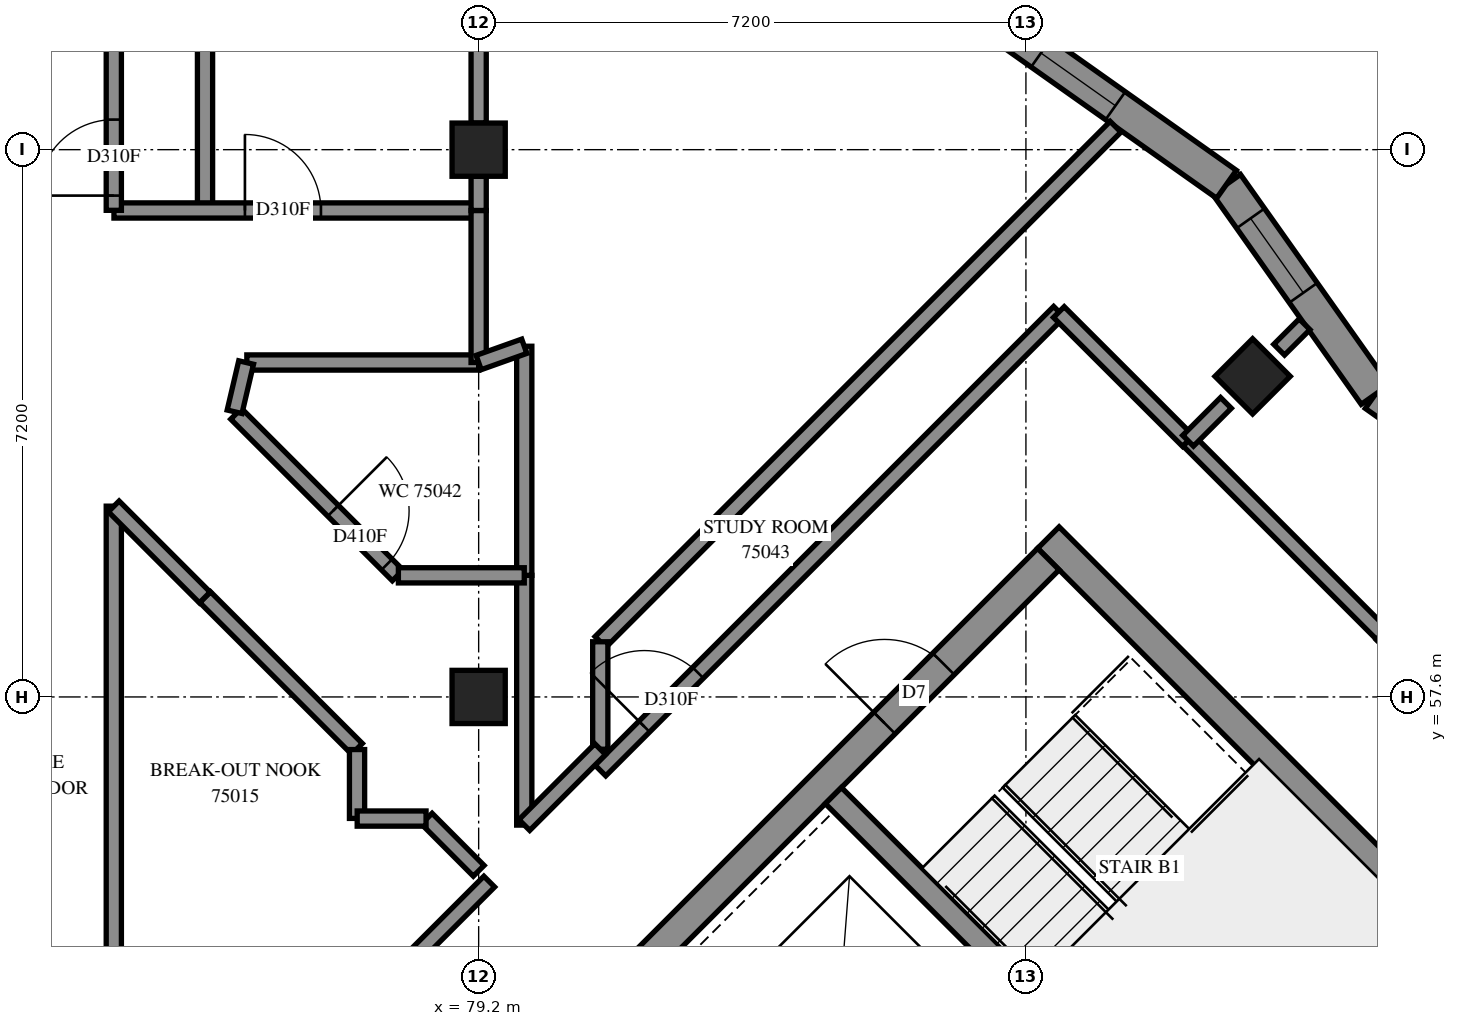
"""IFC4 building model, lengths in metres.
Left out: names, types, materials, properties, quantities, classifications, styles, units other than length and angle.
Written with IfcOpenShell. Run it as: python <this file> out.ifc"""

import sys

from ifc_helpers import new_model, si_unit, direction, frame, frame_2d, origin, origin_2d, place, context, subcontext, project, spatial, polyline, rectangle, outline, extrude, element, fill, save


model = new_model("IFC4")
c1 = context("Model", 3, precision=1e-05, world=origin(), true_north=direction((0.0, 1.0)))
c2 = subcontext(c1, "Body", "Model", "MODEL_VIEW")
j1 = project(units=[si_unit("LENGTHUNIT", "METRE"), si_unit("PLANEANGLEUNIT", "RADIAN")], contexts=[c1])
p1 = place(None, origin())
s1 = spatial("IfcSite", under=j1, at=p1, CompositionType="ELEMENT")
p2 = place(p1, origin())
s2 = spatial("IfcBuilding", under=s1, at=p2, CompositionType="ELEMENT")
p3 = place(p2, frame((0.0, 0.0, 274.4)))
s3 = spatial("IfcBuildingStorey", under=s2, at=p3, CompositionType="ELEMENT", Elevation=274.4)
for number, where, z_axis, x_axis in (
    (1, (79.2, 57.6, 0.0), (0.0, 0.0, 1.0), (1.0, 0.0, 0.0)),
    (2, (79.2, 64.8, 0.0), (0.0, 0.0, 1.0), (1.0, 0.0, 0.0)),
    (3, (89.382, 61.818, 0.0), (0.0, 0.0, 1.0), (0.707, -0.707, 0.0)),
):
    element("IfcColumn", number, at=place(p3, frame(where, z_axis=z_axis, x_axis=x_axis)), inside=s3, PredefinedType="COLUMN", context=c2, shape_type="SweptSolid", body=[
        extrude(rectangle(XDim=0.7, YDim=0.7, at=origin_2d()), origin(), (0.0, 0.0, 1.0), 3.1),
    ])
p4 = place(p3, frame((86.695, 59.696, -0.3), z_axis=(0.0, 0.0, 1.0), x_axis=(0.7071100706, -0.7071034917, 0.0)))
e4 = element("IfcWall", 4, at=p4, inside=s3, PredefinedType="SHEAR", context=c2, shape_type="SweptSolid", body=[
    extrude(rectangle(XDim=15.2, YDim=0.4, at=frame_2d((7.6, 0.0))), origin(), (0.0, 0.0, 1.0), 2.7),
])
p5 = place(p4, frame((10.4, 0.0, 0.3)))
e5 = element("IfcOpeningElement", 5, at=p5, cuts=e4, PredefinedType="OPENING", context=c2, shape_type="SweptSolid", body=[
    extrude(rectangle(XDim=0.8, YDim=2.1, at=frame_2d((0.4, 1.05))), frame((0.0, 0.21, 0.0), z_axis=(0.0, -1.0, 0.0), x_axis=(1.0, 0.0, 0.0)), (0.0, 0.0, 1.0), 0.42),
])
p6 = place(p3, frame((76.513, 49.231, -0.3), z_axis=(0.0, 0.0, 1.0), x_axis=(0.7071067812, 0.7071067812, 0.0)))
e6 = element("IfcWall", 6, at=p6, inside=s3, PredefinedType="SHEAR", context=c2, shape_type="SweptSolid", body=[
    extrude(rectangle(XDim=14.4, YDim=0.4, at=frame_2d((7.2, 0.0))), origin(), (0.0, 0.0, 1.0), 2.7),
])
p7 = place(p6, frame((4.55, 0.0, 0.3)))
e7 = element("IfcOpeningElement", 7, at=p7, cuts=e6, PredefinedType="OPENING", context=c2, shape_type="SweptSolid", body=[
    extrude(rectangle(XDim=1.1, YDim=2.1, at=frame_2d((0.55, 1.05))), frame((0.0, 0.21, 0.0), z_axis=(0.0, -1.0, 0.0), x_axis=(1.0, 0.0, 0.0)), (0.0, 0.0, 1.0), 0.42),
])
p8 = place(p6, frame((11.35, 0.0, 0.3)))
e8 = element("IfcOpeningElement", 8, at=p8, cuts=e6, PredefinedType="OPENING", context=c2, shape_type="SweptSolid", body=[
    extrude(rectangle(XDim=1.1, YDim=2.1, at=frame_2d((0.55, 1.05))), frame((0.0, 0.21, 0.0), z_axis=(0.0, -1.0, 0.0), x_axis=(1.0, 0.0, 0.0)), (0.0, 0.0, 1.0), 0.42),
])
p9 = place(p3, frame((83.867, 56.302, 0.0), z_axis=(0.0, 0.0, 1.0), x_axis=(0.7071137256, -0.7070998367, 0.0)))
e9 = element("IfcWall", 9, at=p9, inside=s3, PredefinedType="SOLIDWALL", context=c2, shape_type="SweptSolid", body=[
    extrude(rectangle(XDim=7.2, YDim=0.3, at=frame_2d((3.6, 0.0))), origin(), (0.0, 0.0, 1.0), 3.1),
])
p10 = place(p3, frame((93.76, 59.623, 0.0), z_axis=(0.0, 0.0, 1.0), x_axis=(-0.8163643715, 0.5775371961, 0.0)))
e10 = element("IfcWall", 10, at=p10, inside=s3, PredefinedType="SOLIDWALL", context=c2, shape_type="SweptSolid", body=[
    extrude(outline(polyline([(-0.039, -0.225), (3.348, -0.225), (3.425, 0.225), (0.039, 0.225), (-0.039, -0.225)])), origin(), (0.0, 0.0, 1.0), 3.1),
])
p11 = place(p10, frame((1.525, 0.0, 0.45)))
e11 = element("IfcOpeningElement", 11, at=p11, cuts=e10, PredefinedType="OPENING", context=c2, shape_type="SweptSolid", body=[
    extrude(rectangle(XDim=1.2, YDim=2.55, at=frame_2d((0.6, 1.275))), frame((0.0, 0.235, 0.0), z_axis=(0.0, -1.0, 0.0), x_axis=(1.0, 0.0, 0.0)), (0.0, 0.0, 1.0), 0.47),
])
p12 = place(p3, frame((90.995, 61.579, 0.0), z_axis=(0.0, 0.0, 1.0), x_axis=(-0.5775314394, 0.8163684441, 0.0)))
e12 = element("IfcWall", 12, at=p12, inside=s3, PredefinedType="SOLIDWALL", context=c2, shape_type="SweptSolid", body=[
    extrude(outline(polyline([(0.039, -0.225), (3.425, -0.225), (3.348, 0.225), (-0.039, 0.225), (0.039, -0.225)])), origin(), (0.0, 0.0, 1.0), 3.1),
])
p13 = place(p12, frame((1.638, 0.0, 0.45)))
e13 = element("IfcOpeningElement", 13, at=p13, cuts=e12, PredefinedType="OPENING", context=c2, shape_type="SweptSolid", body=[
    extrude(rectangle(XDim=1.2, YDim=2.55, at=frame_2d((0.6, 1.275))), frame((0.0, 0.235, 0.0), z_axis=(0.0, -1.0, 0.0), x_axis=(1.0, 0.0, 0.0)), (0.0, 0.0, 1.0), 0.47),
])
p14 = place(p3, frame((89.039, 64.344, 0.0), z_axis=(0.0, 0.0, 1.0), x_axis=(-0.8163643715, 0.5775371961, 0.0)))
e14 = element("IfcWall", 14, at=p14, inside=s3, PredefinedType="SOLIDWALL", context=c2, shape_type="SweptSolid", body=[
    extrude(outline(polyline([(-0.039, -0.225), (3.348, -0.225), (3.425, 0.225), (0.039, 0.225), (-0.039, -0.225)])), origin(), (0.0, 0.0, 1.0), 3.1),
])
p15 = place(p14, frame((1.79, 0.0, 0.45)))
e15 = element("IfcOpeningElement", 15, at=p15, cuts=e14, PredefinedType="OPENING", context=c2, shape_type="SweptSolid", body=[
    extrude(rectangle(XDim=1.2, YDim=2.55, at=frame_2d((0.6, 1.275))), frame((0.0, 0.235, 0.0), z_axis=(0.0, -1.0, 0.0), x_axis=(1.0, 0.0, 0.0)), (0.0, 0.0, 1.0), 0.47),
])
p16 = place(p3, frame((80.803, 58.323, 0.0), z_axis=(0.0, 0.0, 1.0), x_axis=(0.7070024374, 0.7072111096, 0.0)))
e16 = element("IfcWall", 16, at=p16, inside=s3, PredefinedType="PARTITIONING", context=c2, shape_type="SweptSolid", body=[
    extrude(rectangle(XDim=9.584, YDim=0.2, at=frame_2d((4.792, 0.0))), origin(), (0.0, 0.0, 1.0), 3.1),
])
p17 = place(p3, frame((75.6, 64.0, 0.0), z_axis=(0.0, 0.0, 1.0), x_axis=(0.0, 1.0, 0.0)))
e17 = element("IfcWall", 17, at=p17, inside=s3, PredefinedType="PARTITIONING", context=c2, shape_type="SweptSolid", body=[
    extrude(rectangle(XDim=8.856, YDim=0.2, at=frame_2d((4.428, 0.0))), origin(), (0.0, 0.0, 1.0), 3.1),
])
p18 = place(p3, frame((80.802, 56.633, 0.0), z_axis=(0.0, 0.0, 1.0), x_axis=(0.7071067812, 0.7071067812, 0.0)))
e18 = element("IfcWall", 18, at=p18, inside=s3, PredefinedType="PARTITIONING", context=c2, shape_type="SweptSolid", body=[
    extrude(rectangle(XDim=8.533, YDim=0.2, at=frame_2d((4.267, 0.0))), origin(), (0.0, 0.0, 1.0), 3.1),
])
p19 = place(p18, frame((0.817, 0.0, 0.0)))
e19 = element("IfcOpeningElement", 19, at=p19, cuts=e18, PredefinedType="OPENING", context=c2, shape_type="SweptSolid", body=[
    extrude(rectangle(XDim=1.0, YDim=2.1, at=frame_2d((0.5, 1.05))), frame((0.0, 0.11, 0.0), z_axis=(0.0, -1.0, 0.0), x_axis=(1.0, 0.0, 0.0)), (0.0, 0.0, 1.0), 0.22),
])
p20 = place(p3, frame((91.08, 58.424, 0.0), z_axis=(0.0, 0.0, 1.0), x_axis=(0.7069678741, -0.707245661, 0.0)))
e20 = element("IfcWall", 20, at=p20, inside=s3, PredefinedType="PARTITIONING", context=c2, shape_type="SweptSolid", body=[
    extrude(rectangle(XDim=7.2, YDim=0.2, at=frame_2d((3.6, 0.0))), origin(), (0.0, 0.0, 1.0), 3.1),
])
p21 = place(p20, frame((2.084, 0.0, 0.0)))
e21 = element("IfcOpeningElement", 21, at=p21, cuts=e20, PredefinedType="OPENING", context=c2, shape_type="SweptSolid", body=[
    extrude(rectangle(XDim=1.0, YDim=2.1, at=frame_2d((0.5, 1.05))), frame((0.0, 0.11, 0.0), z_axis=(0.0, -1.0, 0.0), x_axis=(1.0, 0.0, 0.0)), (0.0, 0.0, 1.0), 0.22),
])
p22 = place(p3, frame((74.4, 53.202, 0.0), z_axis=(0.0, 0.0, 1.0), x_axis=(0.0, 1.0, 0.0)))
e22 = element("IfcWall", 22, at=p22, inside=s3, PredefinedType="PARTITIONING", context=c2, shape_type="SweptSolid", body=[
    extrude(rectangle(XDim=6.908, YDim=0.2, at=frame_2d((3.454, 0.0))), origin(), (0.0, 0.0, 1.0), 3.1),
])
p23 = place(p3, frame((79.2, 65.15, 0.0), z_axis=(0.0, 0.0, 1.0), x_axis=(0.0, 1.0, 0.0)))
e23 = element("IfcWall", 23, at=p23, inside=s3, PredefinedType="PARTITIONING", context=c2, shape_type="SweptSolid", body=[
    extrude(rectangle(XDim=6.5, YDim=0.2, at=frame_2d((3.25, 0.0))), origin(), (0.0, 0.0, 1.0), 3.1),
])
p24 = place(p3, frame((74.402, 64.0, 0.0), z_axis=(0.0, 0.0, 1.0), x_axis=(1.0, 0.0, 0.0)))
e24 = element("IfcWall", 24, at=p24, inside=s3, PredefinedType="PARTITIONING", context=c2, shape_type="SweptSolid", body=[
    extrude(rectangle(XDim=4.798, YDim=0.2, at=frame_2d((2.399, 0.0))), origin(), (0.0, 0.0, 1.0), 3.1),
])
p25 = place(p24, frame((1.723, 0.0, 0.0)))
e25 = element("IfcOpeningElement", 25, at=p25, cuts=e24, PredefinedType="OPENING", context=c2, shape_type="SweptSolid", body=[
    extrude(rectangle(XDim=1.0, YDim=2.1, at=frame_2d((0.5, 1.05))), frame((0.0, 0.11, 0.0), z_axis=(0.0, -1.0, 0.0), x_axis=(1.0, 0.0, 0.0)), (0.0, 0.0, 1.0), 0.22),
])
p26 = place(p3, frame((88.537, 60.973, 0.0), z_axis=(0.0, 0.0, 1.0), x_axis=(0.7071067812, -0.7071067812, 0.0)))
e26 = element("IfcWall", 26, at=p26, inside=s3, PredefinedType="PARTITIONING", context=c2, shape_type="SweptSolid", body=[
    extrude(rectangle(XDim=3.601, YDim=0.2, at=frame_2d((1.8, 0.0))), origin(), (0.0, 0.0, 1.0), 3.1),
])
p27 = place(p3, frame((79.8, 55.914, 0.0), z_axis=(0.0, 0.0, 1.0), x_axis=(0.0, 1.0, 0.0)))
e27 = element("IfcWall", 27, at=p27, inside=s3, PredefinedType="PARTITIONING", context=c2, shape_type="SweptSolid", body=[
    extrude(rectangle(XDim=3.286, YDim=0.2, at=frame_2d((1.643, 0.0))), origin(), (0.0, 0.0, 1.0), 3.1),
])
p28 = place(p3, frame((74.4, 64.002, 0.0), z_axis=(0.0, 0.0, 1.0), x_axis=(0.0, 1.0, 0.0)))
e28 = element("IfcWall", 28, at=p28, inside=s3, PredefinedType="PARTITIONING", context=c2, shape_type="SweptSolid", body=[
    extrude(rectangle(XDim=3.198, YDim=0.2, at=frame_2d((1.599, 0.0))), origin(), (0.0, 0.0, 1.0), 3.1),
])
p29 = place(p28, frame((0.194, 0.0, 0.0)))
e29 = element("IfcOpeningElement", 29, at=p29, cuts=e28, PredefinedType="OPENING", context=c2, shape_type="SweptSolid", body=[
    extrude(rectangle(XDim=1.0, YDim=2.1, at=frame_2d((0.5, 1.05))), frame((0.0, 0.11, 0.0), z_axis=(0.0, -1.0, 0.0), x_axis=(1.0, 0.0, 0.0)), (0.0, 0.0, 1.0), 0.22),
])
p30 = place(p3, frame((76.15, 62.0, 0.0), z_axis=(0.0, 0.0, 1.0), x_axis=(1.0, 0.0, 0.0)))
e30 = element("IfcWall", 30, at=p30, inside=s3, PredefinedType="PARTITIONING", context=c2, shape_type="SweptSolid", body=[
    extrude(rectangle(XDim=3.05, YDim=0.2, at=frame_2d((1.525, 0.0))), origin(), (0.0, 0.0, 1.0), 3.1),
])
p31 = place(p3, frame((79.8, 59.2, 0.0), z_axis=(0.0, 0.0, 1.0), x_axis=(0.0, 1.0, 0.0)))
e31 = element("IfcWall", 31, at=p31, inside=s3, PredefinedType="PARTITIONING", context=c2, shape_type="SweptSolid", body=[
    extrude(rectangle(XDim=3.014, YDim=0.2, at=frame_2d((1.507, 0.0))), origin(), (0.0, 0.0, 1.0), 3.1),
])
p32 = place(p3, frame((76.009, 61.325, 0.0), z_axis=(0.0, 0.0, 1.0), x_axis=(0.7071067812, -0.7071067812, 0.0)))
e32 = element("IfcWall", 32, at=p32, inside=s3, PredefinedType="PARTITIONING", context=c2, shape_type="SweptSolid", body=[
    extrude(rectangle(XDim=3.007, YDim=0.2, at=frame_2d((1.503, 0.0))), origin(), (0.0, 0.0, 1.0), 3.1),
])
p33 = place(p32, frame((1.804, 0.0, 0.0)))
e33 = element("IfcOpeningElement", 33, at=p33, cuts=e32, PredefinedType="OPENING", context=c2, shape_type="SweptSolid", body=[
    extrude(rectangle(XDim=1.0, YDim=2.1, at=frame_2d((0.5, 1.05))), frame((0.0, 0.11, 0.0), z_axis=(0.0, -1.0, 0.0), x_axis=(1.0, 0.0, 0.0)), (0.0, 0.0, 1.0), 0.22),
])
p34 = place(p3, frame((75.601, 58.913, 0.0), z_axis=(0.0, 0.0, 1.0), x_axis=(0.707460777, -0.7067526081, 0.0)))
e34 = element("IfcWall", 34, at=p34, inside=s3, PredefinedType="PARTITIONING", context=c2, shape_type="SweptSolid", body=[
    extrude(rectangle(XDim=2.824, YDim=0.2, at=frame_2d((1.412, 0.0))), origin(), (0.0, 0.0, 1.0), 3.1),
])
p35 = place(p3, frame((77.37, 53.2, 0.0), z_axis=(0.0, 0.0, 1.0), x_axis=(0.7071067812, 0.7071067812, 0.0)))
e35 = element("IfcWall", 35, at=p35, inside=s3, PredefinedType="PARTITIONING", context=c2, shape_type="SweptSolid", body=[
    extrude(rectangle(XDim=2.786, YDim=0.2, at=frame_2d((1.393, 0.0))), origin(), (0.0, 0.0, 1.0), 3.1),
])
p36 = place(p3, frame((86.833, 62.663, 0.0), z_axis=(0.0, 0.0, 1.0), x_axis=(0.7075233388, -0.706689978, 0.0)))
e36 = element("IfcWall", 36, at=p36, inside=s3, PredefinedType="PARTITIONING", context=c2, shape_type="SweptSolid", body=[
    extrude(rectangle(XDim=2.4, YDim=0.2, at=frame_2d((1.2, 0.0))), origin(), (0.0, 0.0, 1.0), 3.1),
])
p37 = place(p3, frame((79.2, 62.0, 0.0), z_axis=(0.0, 0.0, 1.0), x_axis=(0.0, 1.0, 0.0)))
e37 = element("IfcWall", 37, at=p37, inside=s3, PredefinedType="PARTITIONING", context=c2, shape_type="SweptSolid", body=[
    extrude(rectangle(XDim=2.0, YDim=0.2, at=frame_2d((1.0, 0.0))), origin(), (0.0, 0.0, 1.0), 3.1),
])
p38 = place(p3, frame((74.399, 60.107, 0.0), z_axis=(0.0, 0.0, 1.0), x_axis=(0.7071067812, -0.7071067812, 0.0)))
e38 = element("IfcWall", 38, at=p38, inside=s3, PredefinedType="PARTITIONING", context=c2, shape_type="SweptSolid", body=[
    extrude(rectangle(XDim=1.694, YDim=0.2, at=frame_2d((0.847, 0.0))), origin(), (0.0, 0.0, 1.0), 3.1),
])
p39 = place(p3, frame((78.144, 59.2, 0.0), z_axis=(0.0, 0.0, 1.0), x_axis=(1.0, 0.0, 0.0)))
e39 = element("IfcWall", 39, at=p39, inside=s3, PredefinedType="PARTITIONING", context=c2, shape_type="SweptSolid", body=[
    extrude(rectangle(XDim=1.656, YDim=0.2, at=frame_2d((0.828, 0.0))), origin(), (0.0, 0.0, 1.0), 3.1),
])
p40 = place(p3, frame((80.8, 56.912, 0.0), z_axis=(0.0, 0.0, 1.0), x_axis=(0.0, 1.0, 0.0)))
e40 = element("IfcWall", 40, at=p40, inside=s3, PredefinedType="PARTITIONING", context=c2, shape_type="SweptSolid", body=[
    extrude(rectangle(XDim=1.414, YDim=0.2, at=frame_2d((0.707, 0.0))), origin(), (0.0, 0.0, 1.0), 3.1),
])
p41 = place(p3, frame((79.801, 55.915, 0.0), z_axis=(0.0, 0.0, 1.0), x_axis=(0.7071067812, 0.7071067812, 0.0)))
e41 = element("IfcWall", 41, at=p41, inside=s3, PredefinedType="PARTITIONING", context=c2, shape_type="SweptSolid", body=[
    extrude(rectangle(XDim=1.411, YDim=0.2, at=frame_2d((0.706, 0.0))), origin(), (0.0, 0.0, 1.0), 3.1),
])
p42 = place(p3, frame((78.517, 55.999, 0.0), z_axis=(0.0, 0.0, 1.0), x_axis=(0.7060737561, -0.7081382993, 0.0)))
e42 = element("IfcWall", 42, at=p42, inside=s3, PredefinedType="PARTITIONING", context=c2, shape_type="SweptSolid", body=[
    extrude(rectangle(XDim=0.969, YDim=0.2, at=frame_2d((0.484, 0.0))), origin(), (0.0, 0.0, 1.0), 3.1),
])
for number, where, z_axis, x_axis in (
    (43, (77.6, 56.002, 0.0), (0.0, 0.0, 1.0), (0.0, 1.0, 0.0)),
    (44, (77.602, 56.0, 0.0), (0.0, 0.0, 1.0), (1.0, 0.0, 0.0)),
):
    element("IfcWall", number, at=place(p3, frame(where, z_axis=z_axis, x_axis=x_axis)), inside=s3, PredefinedType="PARTITIONING", context=c2, shape_type="SweptSolid", body=[
        extrude(rectangle(XDim=0.906, YDim=0.2, at=frame_2d((0.453, 0.0))), origin(), (0.0, 0.0, 1.0), 3.1),
    ])
p43 = place(p3, frame((88.534, 60.971, 0.0), z_axis=(0.0, 0.0, 1.0), x_axis=(0.7071067812, 0.7071067812, 0.0)))
e45 = element("IfcWall", 45, at=p43, inside=s3, PredefinedType="PARTITIONING", context=c2, shape_type="SweptSolid", body=[
    extrude(rectangle(XDim=0.704, YDim=0.2, at=frame_2d((0.352, 0.0))), origin(), (0.0, 0.0, 1.0), 3.1),
])
p44 = place(p3, frame((75.989, 61.352, 0.0), z_axis=(0.0, 0.0, 1.0), x_axis=(0.2283693435, 0.9735745698, 0.0)))
e46 = element("IfcWall", 46, at=p44, inside=s3, PredefinedType="PARTITIONING", context=c2, shape_type="SweptSolid", body=[
    extrude(rectangle(XDim=0.666, YDim=0.2, at=frame_2d((0.333, 0.0))), origin(), (0.0, 0.0, 1.0), 3.1),
])
p45 = place(p3, frame((79.2, 62.0, 0.0), z_axis=(0.0, 0.0, 1.0), x_axis=(0.9418838915, 0.335938588, 0.0)))
e47 = element("IfcWall", 47, at=p45, inside=s3, PredefinedType="PARTITIONING", context=c2, shape_type="SweptSolid", body=[
    extrude(rectangle(XDim=0.637, YDim=0.2, at=frame_2d((0.319, 0.0))), origin(), (0.0, 0.0, 1.0), 3.1),
])
p46 = place(p3, frame((79.2, 64.0, 0.0), z_axis=(0.0, 0.0, 1.0), x_axis=(0.0, 1.0, 0.0)))
e48 = element("IfcWall", 48, at=p46, inside=s3, PredefinedType="PARTITIONING", context=c2, shape_type="SweptSolid", body=[
    extrude(rectangle(XDim=0.45, YDim=0.2, at=frame_2d((0.225, 0.0))), origin(), (0.0, 0.0, 1.0), 3.1),
])
p47 = place(p3, frame((89.731, 62.169, 0.0), z_axis=(0.0, 0.0, 1.0), x_axis=(0.7071067812, 0.7071067812, 0.0)))
e49 = element("IfcWall", 49, at=p47, inside=s3, PredefinedType="PARTITIONING", context=c2, shape_type="SweptSolid", body=[
    extrude(rectangle(XDim=0.473, YDim=0.2, at=frame_2d((0.236, 0.0))), origin(), (0.0, 0.0, 1.0), 3.1),
])
p48 = place(p13, origin())
e50 = element("IfcWindow", 50, at=p48, inside=s3, PartitioningType="SINGLE_PANEL", PredefinedType="WINDOW", context=c2, shape_type="SweptSolid", body=[
    extrude(rectangle(XDim=1.2, YDim=2.55, at=frame_2d((0.6, 1.275))), frame((0.0, 0.205, 0.0), z_axis=(0.0, -1.0, 0.0), x_axis=(1.0, 0.0, 0.0)), (0.0, 0.0, 1.0), 0.06),
])
fill(e13, e50)
p49 = place(p15, origin())
e51 = element("IfcWindow", 51, at=p49, inside=s3, PartitioningType="SINGLE_PANEL", PredefinedType="WINDOW", context=c2, shape_type="SweptSolid", body=[
    extrude(rectangle(XDim=1.2, YDim=2.55, at=frame_2d((0.6, 1.275))), frame((0.0, 0.205, 0.0), z_axis=(0.0, -1.0, 0.0), x_axis=(1.0, 0.0, 0.0)), (0.0, 0.0, 1.0), 0.06),
])
fill(e15, e51)
p50 = place(p8, origin())
e52 = element("IfcDoor", 52, at=p50, inside=s3, OperationType="SINGLE_SWING_LEFT", PredefinedType="DOOR", context=c2, shape_type="SweptSolid", body=[
    extrude(rectangle(XDim=1.1, YDim=2.1, at=frame_2d((0.55, 1.05))), frame((0.0, 0.025, 0.0), z_axis=(0.0, -1.0, 0.0), x_axis=(1.0, 0.0, 0.0)), (0.0, 0.0, 1.0), 0.05),
])
fill(e8, e52)
p51 = place(p29, origin())
e53 = element("IfcDoor", 53, at=p51, inside=s3, OperationType="SINGLE_SWING_RIGHT", PredefinedType="DOOR", context=c2, shape_type="SweptSolid", body=[
    extrude(rectangle(XDim=1.0, YDim=2.1, at=frame_2d((0.5, 1.05))), frame((0.0, 0.025, 0.0), z_axis=(0.0, -1.0, 0.0), x_axis=(1.0, 0.0, 0.0)), (0.0, 0.0, 1.0), 0.05),
])
fill(e29, e53)
p52 = place(p25, origin())
e54 = element("IfcDoor", 54, at=p52, inside=s3, OperationType="SINGLE_SWING_LEFT", PredefinedType="DOOR", context=c2, shape_type="SweptSolid", body=[
    extrude(rectangle(XDim=1.0, YDim=2.1, at=frame_2d((0.5, 1.05))), frame((0.0, 0.025, 0.0), z_axis=(0.0, -1.0, 0.0), x_axis=(1.0, 0.0, 0.0)), (0.0, 0.0, 1.0), 0.05),
])
fill(e25, e54)
p53 = place(p33, origin())
e55 = element("IfcDoor", 55, at=p53, inside=s3, OperationType="SINGLE_SWING_LEFT", PredefinedType="DOOR", context=c2, shape_type="SweptSolid", body=[
    extrude(rectangle(XDim=1.0, YDim=2.1, at=frame_2d((0.5, 1.05))), frame((0.0, 0.025, 0.0), z_axis=(0.0, -1.0, 0.0), x_axis=(1.0, 0.0, 0.0)), (0.0, 0.0, 1.0), 0.05),
])
fill(e33, e55)
p54 = place(p19, origin())
e56 = element("IfcDoor", 56, at=p54, inside=s3, OperationType="SINGLE_SWING_RIGHT", PredefinedType="DOOR", context=c2, shape_type="SweptSolid", body=[
    extrude(rectangle(XDim=1.0, YDim=2.1, at=frame_2d((0.5, 1.05))), frame((0.0, 0.025, 0.0), z_axis=(0.0, -1.0, 0.0), x_axis=(1.0, 0.0, 0.0)), (0.0, 0.0, 1.0), 0.05),
])
fill(e19, e56)
save(model, sys.argv[1])
